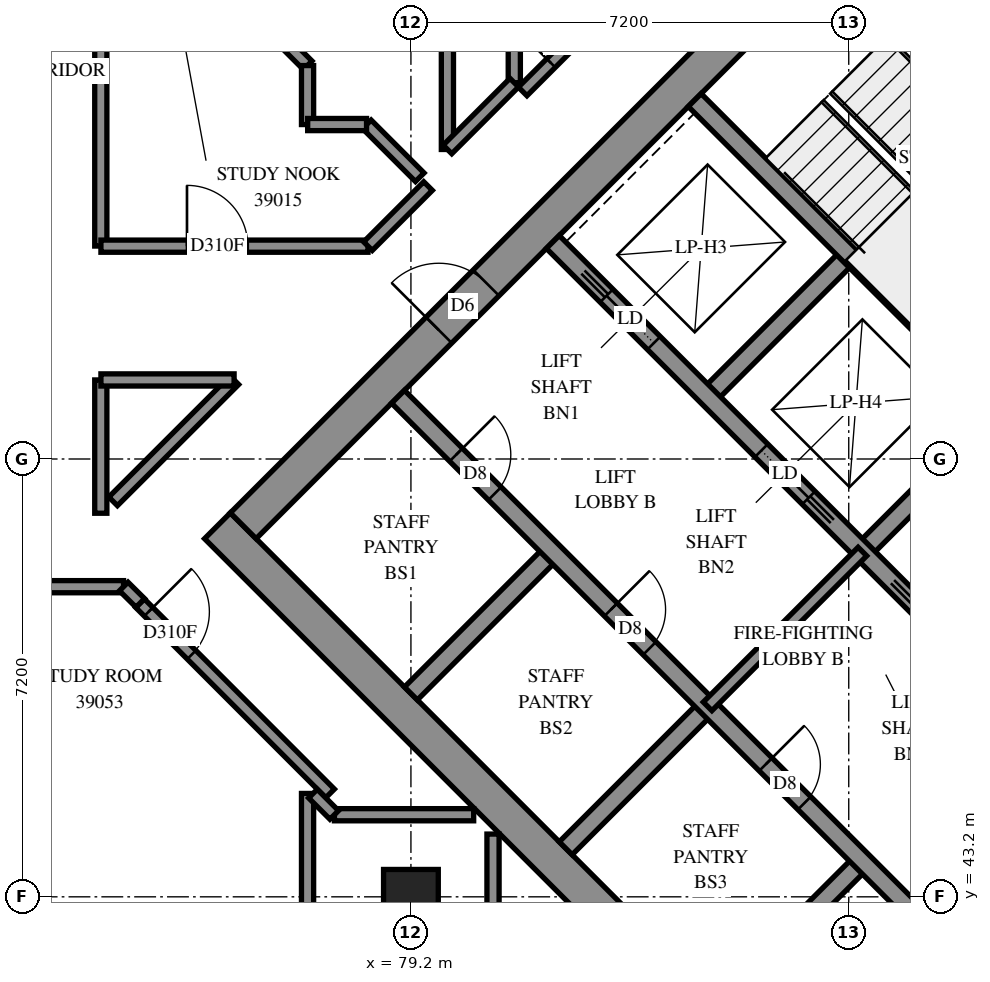
"""IFC4 building model, lengths in metres.
Left out: names, types, materials, properties, quantities, classifications, styles, units other than length and angle.
Written with IfcOpenShell. Run it as: python <this file> out.ifc"""

import sys

from ifc_helpers import new_model, si_unit, direction, frame, frame_2d, origin, origin_2d, place, context, subcontext, project, spatial, rectangle, extrude, element, fill, save


model = new_model("IFC4")
c1 = context("Model", 3, precision=1e-05, world=origin(), true_north=direction((0.0, 1.0)))
c2 = subcontext(c1, "Body", "Model", "MODEL_VIEW")
j1 = project(units=[si_unit("LENGTHUNIT", "METRE"), si_unit("PLANEANGLEUNIT", "RADIAN")], contexts=[c1])
p1 = place(None, origin())
s1 = spatial("IfcSite", under=j1, at=p1, CompositionType="ELEMENT")
p2 = place(p1, origin())
s2 = spatial("IfcBuilding", under=s1, at=p2, CompositionType="ELEMENT")
p3 = place(p2, frame((0.0, 0.0, 145.6)))
s3 = spatial("IfcBuildingStorey", under=s2, at=p3, CompositionType="ELEMENT", Elevation=145.6)
p4 = place(p3, frame((79.2, 43.2, 0.0), z_axis=(0.0, 0.0, 1.0), x_axis=(1.0, 0.0, 0.0)))
e1 = element("IfcColumn", 1, at=p4, inside=s3, PredefinedType="COLUMN", context=c2, shape_type="SweptSolid", body=[
    extrude(rectangle(XDim=0.9, YDim=0.9, at=origin_2d()), origin(), (0.0, 0.0, 1.0), 3.1),
])
p5 = place(p3, frame((76.018, 49.302, -0.3), z_axis=(0.0, 0.0, 1.0), x_axis=(0.7071067812, -0.7071067812, 0.0)))
e2 = element("IfcWall", 2, at=p5, inside=s3, PredefinedType="SHEAR", context=c2, shape_type="SweptSolid", body=[
    extrude(rectangle(XDim=15.6, YDim=0.6, at=frame_2d((7.8, 0.0))), origin(), (0.0, 0.0, 1.0), 2.7),
])
p6 = place(p3, frame((86.625, 59.908, -0.3), z_axis=(0.0, 0.0, 1.0), x_axis=(0.7071067812, -0.7071067812, 0.0)))
e3 = element("IfcWall", 3, at=p6, inside=s3, PredefinedType="SHEAR", context=c2, shape_type="SweptSolid", body=[
    extrude(rectangle(XDim=15.6, YDim=0.6, at=frame_2d((7.8, 0.0))), origin(), (0.0, 0.0, 1.0), 2.7),
])
p7 = place(p6, frame((10.6, 0.0, 0.3)))
e4 = element("IfcOpeningElement", 4, at=p7, cuts=e3, PredefinedType="OPENING", context=c2, shape_type="SweptSolid", body=[
    extrude(rectangle(XDim=0.8, YDim=2.1, at=frame_2d((0.4, 1.05))), frame((0.0, 0.31, 0.0), z_axis=(0.0, -1.0, 0.0), x_axis=(1.0, 0.0, 0.0)), (0.0, 0.0, 1.0), 0.62),
])
p8 = place(p3, frame((76.442, 49.302, -0.3), z_axis=(0.0, 0.0, 1.0), x_axis=(0.7071067812, 0.7071067812, 0.0)))
e5 = element("IfcWall", 5, at=p8, inside=s3, PredefinedType="SHEAR", context=c2, shape_type="SweptSolid", body=[
    extrude(rectangle(XDim=14.4, YDim=0.6, at=frame_2d((7.2, 0.0))), origin(), (0.0, 0.0, 1.0), 2.7),
])
p9 = place(p8, frame((4.55, 0.0, 0.3)))
e6 = element("IfcOpeningElement", 6, at=p9, cuts=e5, PredefinedType="OPENING", context=c2, shape_type="SweptSolid", body=[
    extrude(rectangle(XDim=1.1, YDim=2.1, at=frame_2d((0.55, 1.05))), frame((0.0, 0.31, 0.0), z_axis=(0.0, -1.0, 0.0), x_axis=(1.0, 0.0, 0.0)), (0.0, 0.0, 1.0), 0.62),
])
p10 = place(p8, frame((11.35, 0.0, 0.3)))
e7 = element("IfcOpeningElement", 7, at=p10, cuts=e5, PredefinedType="OPENING", context=c2, shape_type="SweptSolid", body=[
    extrude(rectangle(XDim=1.1, YDim=2.1, at=frame_2d((0.55, 1.05))), frame((0.0, 0.31, 0.0), z_axis=(0.0, -1.0, 0.0), x_axis=(1.0, 0.0, 0.0)), (0.0, 0.0, 1.0), 0.62),
])
p11 = place(p3, frame((87.049, 38.695, -0.3), z_axis=(0.0, 0.0, 1.0), x_axis=(0.7071067812, 0.7071067812, 0.0)))
e8 = element("IfcWall", 8, at=p11, inside=s3, PredefinedType="SHEAR", context=c2, shape_type="SweptSolid", body=[
    extrude(rectangle(XDim=14.4, YDim=0.6, at=frame_2d((7.2, 0.0))), origin(), (0.0, 0.0, 1.0), 2.7),
])
p12 = place(p11, frame((4.55, 0.0, 0.3)))
e9 = element("IfcOpeningElement", 9, at=p12, cuts=e8, PredefinedType="OPENING", context=c2, shape_type="SweptSolid", body=[
    extrude(rectangle(XDim=1.1, YDim=2.1, at=frame_2d((0.55, 1.05))), frame((0.0, 0.31, 0.0), z_axis=(0.0, -1.0, 0.0), x_axis=(1.0, 0.0, 0.0)), (0.0, 0.0, 1.0), 0.62),
])
p13 = place(p11, frame((11.35, 0.0, 0.3)))
e10 = element("IfcOpeningElement", 10, at=p13, cuts=e8, PredefinedType="OPENING", context=c2, shape_type="SweptSolid", body=[
    extrude(rectangle(XDim=1.1, YDim=2.1, at=frame_2d((0.55, 1.05))), frame((0.0, 0.31, 0.0), z_axis=(0.0, -1.0, 0.0), x_axis=(1.0, 0.0, 0.0)), (0.0, 0.0, 1.0), 0.62),
])
for number, where, z_axis, x_axis in (
    (11, (79.2, 46.544, 0.0), (0.0, 0.0, 1.0), (0.707, 0.707, 0.0)),
    (12, (84.079, 51.423, 0.0), (0.0, 0.0, 1.0), (0.707, 0.707, 0.0)),
):
    element("IfcWall", number, at=place(p3, frame(where, z_axis=z_axis, x_axis=x_axis)), inside=s3, PredefinedType="SOLIDWALL", context=c2, shape_type="SweptSolid", body=[
        extrude(rectangle(XDim=3.3, YDim=0.3, at=frame_2d((1.65, 0.0))), origin(), (0.0, 0.0, 1.0), 3.1),
    ])
p14 = place(p3, frame((81.746, 43.999, 0.0), z_axis=(0.0, 0.0, 1.0), x_axis=(0.7071067812, 0.7071067812, 0.0)))
e13 = element("IfcWall", 13, at=p14, inside=s3, PredefinedType="SOLIDWALL", context=c2, shape_type="SweptSolid", body=[
    extrude(rectangle(XDim=3.3, YDim=0.3, at=frame_2d((1.65, 0.0))), origin(), (0.0, 0.0, 1.0), 3.1),
])
p15 = place(p3, frame((86.625, 48.878, 0.0), z_axis=(0.0, 0.0, 1.0), x_axis=(0.7071067812, 0.7071067812, 0.0)))
e14 = element("IfcWall", 14, at=p15, inside=s3, PredefinedType="SOLIDWALL", context=c2, shape_type="SweptSolid", body=[
    extrude(rectangle(XDim=3.3, YDim=0.3, at=frame_2d((1.65, 0.0))), origin(), (0.0, 0.0, 1.0), 3.1),
])
p16 = place(p3, frame((84.291, 41.453, 0.0), z_axis=(0.0, 0.0, 1.0), x_axis=(0.7071067812, 0.7071067812, 0.0)))
e15 = element("IfcWall", 15, at=p16, inside=s3, PredefinedType="SOLIDWALL", context=c2, shape_type="SweptSolid", body=[
    extrude(rectangle(XDim=3.3, YDim=0.3, at=frame_2d((1.65, 0.0))), origin(), (0.0, 0.0, 1.0), 3.1),
])
p17 = place(p3, frame((78.988, 51.423, 0.0), z_axis=(0.0, 0.0, 1.0), x_axis=(0.7071067812, -0.7071067812, 0.0)))
e16 = element("IfcWall", 16, at=p17, inside=s3, PredefinedType="SOLIDWALL", context=c2, shape_type="SweptSolid", body=[
    extrude(rectangle(XDim=14.4, YDim=0.3, at=frame_2d((7.2, 0.0))), origin(), (0.0, 0.0, 1.0), 3.1),
])
p18 = place(p17, frame((1.35, 0.0, 0.0)))
e17 = element("IfcOpeningElement", 17, at=p18, cuts=e16, PredefinedType="OPENING", context=c2, shape_type="SweptSolid", body=[
    extrude(rectangle(XDim=0.9, YDim=2.1, at=frame_2d((0.45, 1.05))), frame((0.0, 0.16, 0.0), z_axis=(0.0, -1.0, 0.0), x_axis=(1.0, 0.0, 0.0)), (0.0, 0.0, 1.0), 0.32),
])
p19 = place(p17, frame((4.95, 0.0, 0.0)))
e18 = element("IfcOpeningElement", 18, at=p19, cuts=e16, PredefinedType="OPENING", context=c2, shape_type="SweptSolid", body=[
    extrude(rectangle(XDim=0.9, YDim=2.1, at=frame_2d((0.45, 1.05))), frame((0.0, 0.16, 0.0), z_axis=(0.0, -1.0, 0.0), x_axis=(1.0, 0.0, 0.0)), (0.0, 0.0, 1.0), 0.32),
])
p20 = place(p17, frame((8.55, 0.0, 0.0)))
e19 = element("IfcOpeningElement", 19, at=p20, cuts=e16, PredefinedType="OPENING", context=c2, shape_type="SweptSolid", body=[
    extrude(rectangle(XDim=0.9, YDim=2.1, at=frame_2d((0.45, 1.05))), frame((0.0, 0.16, 0.0), z_axis=(0.0, -1.0, 0.0), x_axis=(1.0, 0.0, 0.0)), (0.0, 0.0, 1.0), 0.32),
])
p21 = place(p17, frame((12.05, 0.0, 0.0)))
e20 = element("IfcOpeningElement", 20, at=p21, cuts=e16, PredefinedType="OPENING", context=c2, shape_type="SweptSolid", body=[
    extrude(rectangle(XDim=1.1, YDim=2.1, at=frame_2d((0.55, 1.05))), frame((0.0, 0.16, 0.0), z_axis=(0.0, -1.0, 0.0), x_axis=(1.0, 0.0, 0.0)), (0.0, 0.0, 1.0), 0.32),
])
p22 = place(p3, frame((81.534, 53.969, 0.0), z_axis=(0.0, 0.0, 1.0), x_axis=(0.707103309, -0.7071102534, 0.0)))
e21 = element("IfcWall", 21, at=p22, inside=s3, PredefinedType="SOLIDWALL", context=c2, shape_type="SweptSolid", body=[
    extrude(rectangle(XDim=14.4, YDim=0.3, at=frame_2d((7.2, 0.0))), origin(), (0.0, 0.0, 1.0), 3.1),
])
p23 = place(p22, frame((1.25, 0.0, 0.0)))
e22 = element("IfcOpeningElement", 22, at=p23, cuts=e21, PredefinedType="OPENING", context=c2, shape_type="SweptSolid", body=[
    extrude(rectangle(XDim=1.1, YDim=2.1, at=frame_2d((0.55, 1.05))), frame((0.0, 0.16, 0.0), z_axis=(0.0, -1.0, 0.0), x_axis=(1.0, 0.0, 0.0)), (0.0, 0.0, 1.0), 0.32),
])
p24 = place(p22, frame((4.85, 0.0, 0.0)))
e23 = element("IfcOpeningElement", 23, at=p24, cuts=e21, PredefinedType="OPENING", context=c2, shape_type="SweptSolid", body=[
    extrude(rectangle(XDim=1.1, YDim=2.1, at=frame_2d((0.55, 1.05))), frame((0.0, 0.16, 0.0), z_axis=(0.0, -1.0, 0.0), x_axis=(1.0, 0.0, 0.0)), (0.0, 0.0, 1.0), 0.32),
])
p25 = place(p22, frame((8.45, 0.0, 0.0)))
e24 = element("IfcOpeningElement", 24, at=p25, cuts=e21, PredefinedType="OPENING", context=c2, shape_type="SweptSolid", body=[
    extrude(rectangle(XDim=1.1, YDim=2.1, at=frame_2d((0.55, 1.05))), frame((0.0, 0.16, 0.0), z_axis=(0.0, -1.0, 0.0), x_axis=(1.0, 0.0, 0.0)), (0.0, 0.0, 1.0), 0.32),
])
p26 = place(p22, frame((12.05, 0.0, 0.0)))
e25 = element("IfcOpeningElement", 25, at=p26, cuts=e21, PredefinedType="OPENING", context=c2, shape_type="SweptSolid", body=[
    extrude(rectangle(XDim=1.1, YDim=2.1, at=frame_2d((0.55, 1.05))), frame((0.0, 0.16, 0.0), z_axis=(0.0, -1.0, 0.0), x_axis=(1.0, 0.0, 0.0)), (0.0, 0.0, 1.0), 0.32),
])
p27 = place(p3, frame((83.867, 56.302, 0.0), z_axis=(0.0, 0.0, 1.0), x_axis=(0.7071137256, -0.7070998367, 0.0)))
e26 = element("IfcWall", 26, at=p27, inside=s3, PredefinedType="SOLIDWALL", context=c2, shape_type="SweptSolid", body=[
    extrude(rectangle(XDim=7.2, YDim=0.3, at=frame_2d((3.6, 0.0))), origin(), (0.0, 0.0, 1.0), 3.1),
])
p28 = place(p3, frame((84.079, 46.332, 0.0), z_axis=(0.0, 0.0, 1.0), x_axis=(0.7071067812, 0.7071067812, 0.0)))
e27 = element("IfcWall", 27, at=p28, inside=s3, PredefinedType="PARTITIONING", context=c2, shape_type="SweptSolid", body=[
    extrude(rectangle(XDim=3.6, YDim=0.2, at=frame_2d((1.8, 0.0))), origin(), (0.0, 0.0, 1.0), 3.1),
])
p29 = place(p3, frame((55.5, 48.3, 0.0), z_axis=(0.0, 0.0, 1.0), x_axis=(1.0, 0.0, 0.0)))
e28 = element("IfcWall", 28, at=p29, inside=s3, PredefinedType="PARTITIONING", context=c2, shape_type="SweptSolid", body=[
    extrude(rectangle(XDim=18.974, YDim=0.2, at=frame_2d((9.487, 0.0))), origin(), (0.0, 0.0, 1.0), 3.1),
])
p30 = place(p29, frame((4.4, 0.0, 0.0)))
e29 = element("IfcOpeningElement", 29, at=p30, cuts=e28, PredefinedType="OPENING", context=c2, shape_type="SweptSolid", body=[
    extrude(rectangle(XDim=0.9, YDim=2.1, at=frame_2d((0.45, 1.05))), frame((0.0, 0.11, 0.0), z_axis=(0.0, -1.0, 0.0), x_axis=(1.0, 0.0, 0.0)), (0.0, 0.0, 1.0), 0.22),
])
p31 = place(p29, frame((6.1, 0.0, 0.0)))
e30 = element("IfcOpeningElement", 30, at=p31, cuts=e28, PredefinedType="OPENING", context=c2, shape_type="SweptSolid", body=[
    extrude(rectangle(XDim=0.9, YDim=2.1, at=frame_2d((0.45, 1.05))), frame((0.0, 0.11, 0.0), z_axis=(0.0, -1.0, 0.0), x_axis=(1.0, 0.0, 0.0)), (0.0, 0.0, 1.0), 0.22),
])
p32 = place(p29, frame((13.162, 0.0, 0.0)))
e31 = element("IfcOpeningElement", 31, at=p32, cuts=e28, PredefinedType="OPENING", context=c2, shape_type="SweptSolid", body=[
    extrude(rectangle(XDim=1.0, YDim=2.1, at=frame_2d((0.5, 1.05))), frame((0.0, 0.11, 0.0), z_axis=(0.0, -1.0, 0.0), x_axis=(1.0, 0.0, 0.0)), (0.0, 0.0, 1.0), 0.22),
])
p33 = place(p3, frame((81.038, 56.444, 0.0), z_axis=(0.0, 0.0, 1.0), x_axis=(0.7071067812, 0.7071067812, 0.0)))
e32 = element("IfcWall", 32, at=p33, inside=s3, PredefinedType="PARTITIONING", context=c2, shape_type="SweptSolid", body=[
    extrude(rectangle(XDim=8.2, YDim=0.2, at=frame_2d((4.1, 0.0))), origin(), (0.0, 0.0, 1.0), 3.1),
])
p34 = place(p33, frame((0.66, 0.0, 0.0)))
e33 = element("IfcOpeningElement", 33, at=p34, cuts=e32, PredefinedType="OPENING", context=c2, shape_type="SweptSolid", body=[
    extrude(rectangle(XDim=1.0, YDim=2.1, at=frame_2d((0.5, 1.05))), frame((0.0, 0.11, 0.0), z_axis=(0.0, -1.0, 0.0), x_axis=(1.0, 0.0, 0.0)), (0.0, 0.0, 1.0), 0.22),
])
p35 = place(p3, frame((74.1, 53.902, 0.0), z_axis=(0.0, 0.0, 1.0), x_axis=(0.0, 1.0, 0.0)))
e34 = element("IfcWall", 34, at=p35, inside=s3, PredefinedType="PARTITIONING", context=c2, shape_type="SweptSolid", body=[
    extrude(rectangle(XDim=6.366, YDim=0.2, at=frame_2d((3.183, 0.0))), origin(), (0.0, 0.0, 1.0), 3.1),
])
p36 = place(p3, frame((74.745, 48.029, 0.0), z_axis=(0.0, 0.0, 1.0), x_axis=(0.7068806156, -0.7073328745, 0.0)))
e35 = element("IfcWall", 35, at=p36, inside=s3, PredefinedType="PARTITIONING", context=c2, shape_type="SweptSolid", body=[
    extrude(rectangle(XDim=4.422, YDim=0.2, at=frame_2d((2.211, 0.0))), origin(), (0.0, 0.0, 1.0), 3.1),
])
p37 = place(p36, frame((0.199, 0.0, 0.0)))
e36 = element("IfcOpeningElement", 36, at=p37, cuts=e35, PredefinedType="OPENING", context=c2, shape_type="SweptSolid", body=[
    extrude(rectangle(XDim=1.0, YDim=2.1, at=frame_2d((0.5, 1.05))), frame((0.0, 0.11, 0.0), z_axis=(0.0, -1.0, 0.0), x_axis=(1.0, 0.0, 0.0)), (0.0, 0.0, 1.0), 0.22),
])
p38 = place(p3, frame((74.102, 53.9, 0.0), z_axis=(0.0, 0.0, 1.0), x_axis=(1.0, 0.0, 0.0)))
e37 = element("IfcWall", 37, at=p38, inside=s3, PredefinedType="PARTITIONING", context=c2, shape_type="SweptSolid", body=[
    extrude(rectangle(XDim=4.392, YDim=0.2, at=frame_2d((2.196, 0.0))), origin(), (0.0, 0.0, 1.0), 3.1),
])
p39 = place(p38, frame((1.415, 0.0, 0.0)))
e38 = element("IfcOpeningElement", 38, at=p39, cuts=e37, PredefinedType="OPENING", context=c2, shape_type="SweptSolid", body=[
    extrude(rectangle(XDim=1.0, YDim=2.1, at=frame_2d((0.5, 1.05))), frame((0.0, 0.11, 0.0), z_axis=(0.0, -1.0, 0.0), x_axis=(1.0, 0.0, 0.0)), (0.0, 0.0, 1.0), 0.22),
])
p40 = place(p3, frame((77.5, 41.014, 0.0), z_axis=(0.0, 0.0, 1.0), x_axis=(0.0, 1.0, 0.0)))
e39 = element("IfcWall", 39, at=p40, inside=s3, PredefinedType="PARTITIONING", context=c2, shape_type="SweptSolid", body=[
    extrude(rectangle(XDim=3.886, YDim=0.2, at=frame_2d((1.943, 0.0))), origin(), (0.0, 0.0, 1.0), 3.1),
])
p41 = place(p3, frame((79.8, 55.49, 0.0), z_axis=(0.0, 0.0, 1.0), x_axis=(0.0, 1.0, 0.0)))
e40 = element("IfcWall", 40, at=p41, inside=s3, PredefinedType="PARTITIONING", context=c2, shape_type="SweptSolid", body=[
    extrude(rectangle(XDim=3.81, YDim=0.2, at=frame_2d((1.905, 0.0))), origin(), (0.0, 0.0, 1.0), 3.1),
])
p42 = place(p3, frame((74.302, 49.704, 0.0), z_axis=(0.0, 0.0, 1.0), x_axis=(0.7074614873, 0.706751897, 0.0)))
e41 = element("IfcWall", 41, at=p42, inside=s3, PredefinedType="PARTITIONING", context=c2, shape_type="SweptSolid", body=[
    extrude(rectangle(XDim=2.818, YDim=0.2, at=frame_2d((1.409, 0.0))), origin(), (0.0, 0.0, 1.0), 3.1),
])
p43 = place(p3, frame((75.879, 58.497, 0.0), z_axis=(0.0, 0.0, 1.0), x_axis=(0.7075423257, -0.7066709682, 0.0)))
e42 = element("IfcWall", 42, at=p43, inside=s3, PredefinedType="PARTITIONING", context=c2, shape_type="SweptSolid", body=[
    extrude(rectangle(XDim=2.295, YDim=0.2, at=frame_2d((1.148, 0.0))), origin(), (0.0, 0.0, 1.0), 3.1),
])
for number, where, z_axis, x_axis in (
    (43, (77.942, 44.55, 0.0), (0.0, 0.0, 1.0), (1.0, 0.0, 0.0)),
    (44, (80.55, 41.942, 0.0), (0.0, 0.0, 1.0), (0.0, 1.0, 0.0)),
):
    element("IfcWall", number, at=place(p3, frame(where, z_axis=z_axis, x_axis=x_axis)), inside=s3, PredefinedType="PARTITIONING", context=c2, shape_type="SweptSolid", body=[
        extrude(rectangle(XDim=2.29, YDim=0.2, at=frame_2d((1.145, 0.0))), origin(), (0.0, 0.0, 1.0), 3.1),
    ])
p44 = place(p3, frame((74.1, 49.508, 0.0), z_axis=(0.0, 0.0, 1.0), x_axis=(0.0, 1.0, 0.0)))
e45 = element("IfcWall", 45, at=p44, inside=s3, PredefinedType="PARTITIONING", context=c2, shape_type="SweptSolid", body=[
    extrude(rectangle(XDim=2.192, YDim=0.2, at=frame_2d((1.096, 0.0))), origin(), (0.0, 0.0, 1.0), 3.1),
])
p45 = place(p3, frame((74.102, 51.7, 0.0), z_axis=(0.0, 0.0, 1.0), x_axis=(1.0, 0.0, 0.0)))
e46 = element("IfcWall", 46, at=p45, inside=s3, PredefinedType="PARTITIONING", context=c2, shape_type="SweptSolid", body=[
    extrude(rectangle(XDim=2.19, YDim=0.2, at=frame_2d((1.095, 0.0))), origin(), (0.0, 0.0, 1.0), 3.1),
])
p46 = place(p3, frame((80.9, 56.588, 0.0), z_axis=(0.0, 0.0, 1.0), x_axis=(0.0, 1.0, 0.0)))
e47 = element("IfcWall", 47, at=p46, inside=s3, PredefinedType="PARTITIONING", context=c2, shape_type="SweptSolid", body=[
    extrude(rectangle(XDim=1.838, YDim=0.2, at=frame_2d((0.919, 0.0))), origin(), (0.0, 0.0, 1.0), 3.1),
])
p47 = place(p3, frame((79.801, 55.491, 0.0), z_axis=(0.0, 0.0, 1.0), x_axis=(0.7071067812, 0.7071067812, 0.0)))
e48 = element("IfcWall", 48, at=p47, inside=s3, PredefinedType="PARTITIONING", context=c2, shape_type="SweptSolid", body=[
    extrude(rectangle(XDim=1.553, YDim=0.2, at=frame_2d((0.776, 0.0))), origin(), (0.0, 0.0, 1.0), 3.1),
])
p48 = place(p3, frame((78.494, 53.9, 0.0), z_axis=(0.0, 0.0, 1.0), x_axis=(0.7071067812, 0.7071067812, 0.0)))
e49 = element("IfcWall", 49, at=p48, inside=s3, PredefinedType="PARTITIONING", context=c2, shape_type="SweptSolid", body=[
    extrude(rectangle(XDim=1.397, YDim=0.2, at=frame_2d((0.699, 0.0))), origin(), (0.0, 0.0, 1.0), 3.1),
])
p49 = place(p3, frame((78.475, 55.903, 0.0), z_axis=(0.0, 0.0, 1.0), x_axis=(0.7071067812, -0.7071067812, 0.0)))
e50 = element("IfcWall", 50, at=p49, inside=s3, PredefinedType="PARTITIONING", context=c2, shape_type="SweptSolid", body=[
    extrude(rectangle(XDim=1.23, YDim=0.2, at=frame_2d((0.615, 0.0))), origin(), (0.0, 0.0, 1.0), 3.1),
])
p50 = place(p3, frame((77.5, 55.9, 0.0), z_axis=(0.0, 0.0, 1.0), x_axis=(0.0, 1.0, 0.0)))
e51 = element("IfcWall", 51, at=p50, inside=s3, PredefinedType="PARTITIONING", context=c2, shape_type="SweptSolid", body=[
    extrude(rectangle(XDim=0.97, YDim=0.2, at=frame_2d((0.485, 0.0))), origin(), (0.0, 0.0, 1.0), 3.1),
])
p51 = place(p3, frame((77.502, 55.9, 0.0), z_axis=(0.0, 0.0, 1.0), x_axis=(1.0, 0.0, 0.0)))
e52 = element("IfcWall", 52, at=p51, inside=s3, PredefinedType="PARTITIONING", context=c2, shape_type="SweptSolid", body=[
    extrude(rectangle(XDim=0.968, YDim=0.2, at=frame_2d((0.484, 0.0))), origin(), (0.0, 0.0, 1.0), 3.1),
])
p52 = place(p3, frame((77.588, 44.897, 0.0), z_axis=(0.0, 0.0, 1.0), x_axis=(0.7071067812, -0.7071067812, 0.0)))
e53 = element("IfcWall", 53, at=p52, inside=s3, PredefinedType="PARTITIONING", context=c2, shape_type="SweptSolid", body=[
    extrude(rectangle(XDim=0.495, YDim=0.2, at=frame_2d((0.247, 0.0))), origin(), (0.0, 0.0, 1.0), 3.1),
])
p53 = place(p3, frame((74.477, 48.303, 0.0), z_axis=(0.0, 0.0, 1.0), x_axis=(0.7097111995, -0.7044927348, 0.0)))
e54 = element("IfcWall", 54, at=p53, inside=s3, PredefinedType="PARTITIONING", context=c2, shape_type="SweptSolid", body=[
    extrude(rectangle(XDim=0.383, YDim=0.2, at=frame_2d((0.192, 0.0))), origin(), (0.0, 0.0, 1.0), 3.1),
])
p54 = place(p9, origin())
e55 = element("IfcDoor", 55, at=p54, inside=s3, OperationType="DOUBLE_DOOR_SINGLE_SWING", PredefinedType="DOOR", context=c2, shape_type="SweptSolid", body=[
    extrude(rectangle(XDim=1.1, YDim=2.1, at=frame_2d((0.55, 1.05))), frame((0.0, 0.025, 0.0), z_axis=(0.0, -1.0, 0.0), x_axis=(1.0, 0.0, 0.0)), (0.0, 0.0, 1.0), 0.05),
])
fill(e6, e55)
p55 = place(p18, origin())
e56 = element("IfcDoor", 56, at=p55, inside=s3, OperationType="SINGLE_SWING_LEFT", PredefinedType="DOOR", context=c2, shape_type="SweptSolid", body=[
    extrude(rectangle(XDim=0.9, YDim=2.1, at=frame_2d((0.45, 1.05))), frame((0.0, 0.025, 0.0), z_axis=(0.0, -1.0, 0.0), x_axis=(1.0, 0.0, 0.0)), (0.0, 0.0, 1.0), 0.05),
])
fill(e17, e56)
p56 = place(p19, origin())
e57 = element("IfcDoor", 57, at=p56, inside=s3, OperationType="SINGLE_SWING_LEFT", PredefinedType="DOOR", context=c2, shape_type="SweptSolid", body=[
    extrude(rectangle(XDim=0.9, YDim=2.1, at=frame_2d((0.45, 1.05))), frame((0.0, 0.025, 0.0), z_axis=(0.0, -1.0, 0.0), x_axis=(1.0, 0.0, 0.0)), (0.0, 0.0, 1.0), 0.05),
])
fill(e18, e57)
p57 = place(p20, origin())
e58 = element("IfcDoor", 58, at=p57, inside=s3, OperationType="SINGLE_SWING_LEFT", PredefinedType="DOOR", context=c2, shape_type="SweptSolid", body=[
    extrude(rectangle(XDim=0.9, YDim=2.1, at=frame_2d((0.45, 1.05))), frame((0.0, 0.025, 0.0), z_axis=(0.0, -1.0, 0.0), x_axis=(1.0, 0.0, 0.0)), (0.0, 0.0, 1.0), 0.05),
])
fill(e19, e58)
p58 = place(p23, origin())
e59 = element("IfcDoor", 59, at=p58, inside=s3, OperationType="SLIDING_TO_LEFT", PredefinedType="DOOR", context=c2, shape_type="SweptSolid", body=[
    extrude(rectangle(XDim=1.1, YDim=2.1, at=frame_2d((0.55, 1.05))), frame((0.0, 0.025, 0.0), z_axis=(0.0, -1.0, 0.0), x_axis=(1.0, 0.0, 0.0)), (0.0, 0.0, 1.0), 0.05),
])
fill(e22, e59)
p59 = place(p24, origin())
e60 = element("IfcDoor", 60, at=p59, inside=s3, OperationType="SLIDING_TO_RIGHT", PredefinedType="DOOR", context=c2, shape_type="SweptSolid", body=[
    extrude(rectangle(XDim=1.1, YDim=2.1, at=frame_2d((0.55, 1.05))), frame((0.0, 0.025, 0.0), z_axis=(0.0, -1.0, 0.0), x_axis=(1.0, 0.0, 0.0)), (0.0, 0.0, 1.0), 0.05),
])
fill(e23, e60)
p60 = place(p39, origin())
e61 = element("IfcDoor", 61, at=p60, inside=s3, OperationType="SINGLE_SWING_LEFT", PredefinedType="DOOR", context=c2, shape_type="SweptSolid", body=[
    extrude(rectangle(XDim=1.0, YDim=2.1, at=frame_2d((0.5, 1.05))), frame((0.0, 0.025, 0.0), z_axis=(0.0, -1.0, 0.0), x_axis=(1.0, 0.0, 0.0)), (0.0, 0.0, 1.0), 0.05),
])
fill(e38, e61)
p61 = place(p37, origin())
e62 = element("IfcDoor", 62, at=p61, inside=s3, OperationType="SINGLE_SWING_LEFT", PredefinedType="DOOR", context=c2, shape_type="SweptSolid", body=[
    extrude(rectangle(XDim=1.0, YDim=2.1, at=frame_2d((0.5, 1.05))), frame((0.0, 0.025, 0.0), z_axis=(0.0, -1.0, 0.0), x_axis=(1.0, 0.0, 0.0)), (0.0, 0.0, 1.0), 0.05),
])
fill(e36, e62)
p62 = place(p34, origin())
e63 = element("IfcDoor", 63, at=p62, inside=s3, OperationType="SINGLE_SWING_RIGHT", PredefinedType="DOOR", context=c2, shape_type="SweptSolid", body=[
    extrude(rectangle(XDim=1.0, YDim=2.1, at=frame_2d((0.5, 1.05))), frame((0.0, 0.025, 0.0), z_axis=(0.0, -1.0, 0.0), x_axis=(1.0, 0.0, 0.0)), (0.0, 0.0, 1.0), 0.05),
])
fill(e33, e63)
save(model, sys.argv[1])
